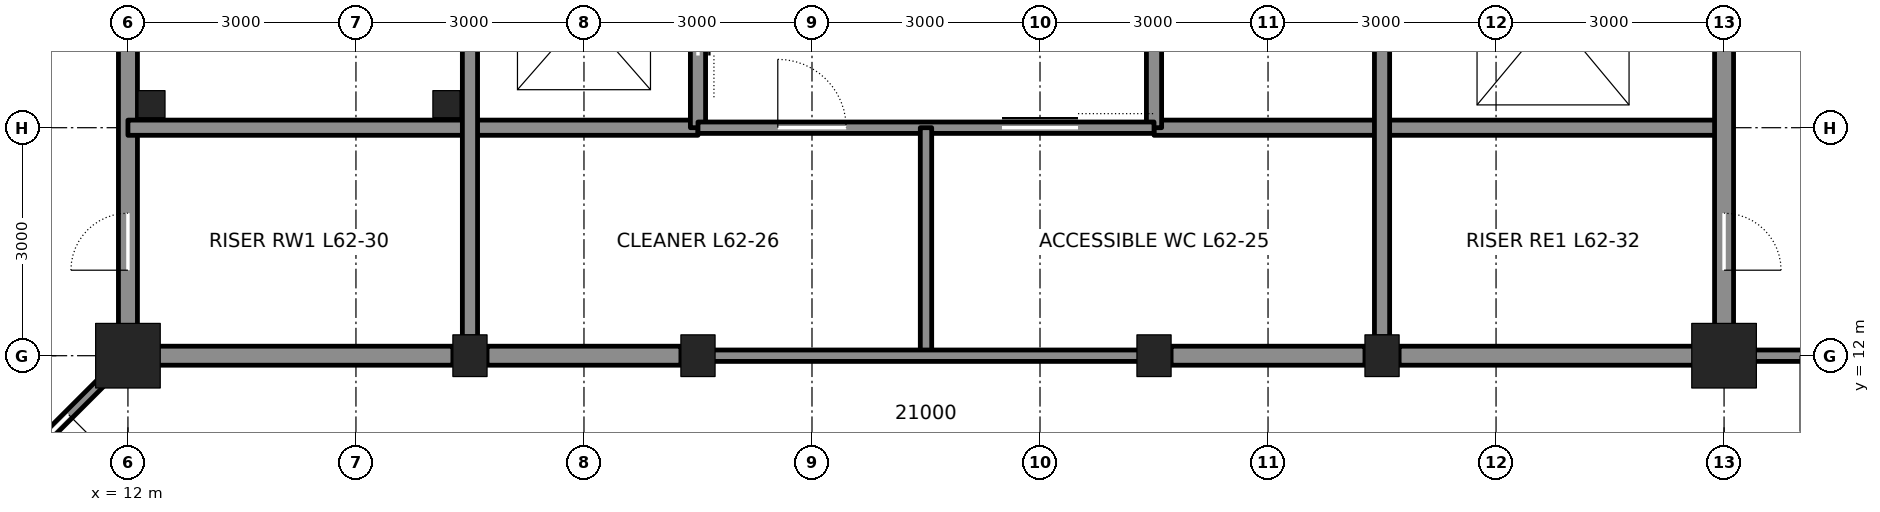
"""IFC4 building model, lengths in metres.
Left out: names, types, materials, properties, quantities, classifications, styles, units other than length and angle.
Written with IfcOpenShell. Run it as: python <this file> out.ifc"""

import sys

from ifc_helpers import new_model, si_unit, direction, frame, frame_2d, origin, origin_2d, place, context, subcontext, project, spatial, rectangle, hollow_rectangle, i_section, extrude, element, fill, save


model = new_model("IFC4")
c1 = context("Model", 3, precision=1e-05, world=origin(), true_north=direction((0.0, 1.0)))
c2 = subcontext(c1, "Body", "Model", "MODEL_VIEW")
j1 = project(units=[si_unit("LENGTHUNIT", "METRE"), si_unit("PLANEANGLEUNIT", "RADIAN")], contexts=[c1])
p1 = place(None, origin())
s1 = spatial("IfcSite", under=j1, at=p1, CompositionType="ELEMENT")
p2 = place(p1, origin())
s2 = spatial("IfcBuilding", under=s1, at=p2, CompositionType="ELEMENT")
p3 = place(p2, frame((0.0, 0.0, 279.0)))
s3 = spatial("IfcBuildingStorey", under=s2, at=p3, CompositionType="ELEMENT", Elevation=279.0)
p4 = place(p3, frame((12.0, 12.0, 0.0), z_axis=(0.0, 0.0, 1.0), x_axis=(1.0, 0.0, 0.0)))
e1 = element("IfcColumn", 1, at=p4, inside=s3, PredefinedType="COLUMN", context=c2, shape_type="SweptSolid", body=[
    extrude(hollow_rectangle(XDim=0.85, YDim=0.85, WallThickness=0.085, at=origin_2d()), origin(), (0.0, 0.0, 1.0), 4.2),
])
for number, where, z_axis, x_axis in (
    (2, (16.5, 12.0, 0.0), (0.0, 0.0, 1.0), (1.0, 0.0, 0.0)),
    (3, (19.5, 12.0, 0.0), (0.0, 0.0, 1.0), (1.0, 0.0, 0.0)),
    (4, (25.5, 12.0, 0.0), (0.0, 0.0, 1.0), (1.0, 0.0, 0.0)),
    (5, (28.5, 12.0, 0.0), (0.0, 0.0, 1.0), (1.0, 0.0, 0.0)),
):
    element("IfcColumn", number, at=place(p3, frame(where, z_axis=z_axis, x_axis=x_axis)), inside=s3, PredefinedType="COLUMN", context=c2, shape_type="SweptSolid", body=[
        extrude(i_section(OverallWidth=0.449, OverallDepth=0.549, WebThickness=0.072, FlangeThickness=0.115, at=origin_2d()), origin(), (0.0, 0.0, 1.0), 4.2),
    ])
p5 = place(p3, frame((33.0, 12.0, 0.0), z_axis=(0.0, 0.0, 1.0), x_axis=(1.0, 0.0, 0.0)))
e6 = element("IfcColumn", 6, at=p5, inside=s3, PredefinedType="COLUMN", context=c2, shape_type="SweptSolid", body=[
    extrude(hollow_rectangle(XDim=0.85, YDim=0.85, WallThickness=0.085, at=origin_2d()), origin(), (0.0, 0.0, 1.0), 4.2),
])
p6 = place(p3, frame((12.0, 12.25, 0.0), z_axis=(0.0, 0.0, 1.0), x_axis=(0.0, 1.0, 0.0)))
e7 = element("IfcWall", 7, at=p6, inside=s3, PredefinedType="SOLIDWALL", context=c2, shape_type="SweptSolid", body=[
    extrude(rectangle(XDim=8.5, YDim=0.25, at=frame_2d((4.25, 0.0))), origin(), (0.0, 0.0, 1.0), 3.113),
])
p7 = place(p6, frame((0.875, 0.0, 0.0)))
e8 = element("IfcOpeningElement", 8, at=p7, cuts=e7, PredefinedType="OPENING", context=c2, shape_type="SweptSolid", body=[
    extrude(rectangle(XDim=0.75, YDim=2.1, at=frame_2d((0.375, 1.05))), frame((0.0, 0.135, 0.0), z_axis=(0.0, -1.0, 0.0), x_axis=(1.0, 0.0, 0.0)), (0.0, 0.0, 1.0), 0.27),
])
p8 = place(p3, frame((12.25, 12.0, 0.0), z_axis=(0.0, 0.0, 1.0), x_axis=(1.0, 0.0, 0.0)))
e9 = element("IfcWall", 9, at=p8, inside=s3, PredefinedType="SOLIDWALL", context=c2, shape_type="SweptSolid", body=[
    extrude(rectangle(XDim=4.025, YDim=0.25, at=frame_2d((2.013, 0.0))), origin(), (0.0, 0.0, 1.0), 3.181),
])
for number, where, z_axis, x_axis in (
    (10, (16.725, 12.0, 0.0), (0.0, 0.0, 1.0), (1.0, 0.0, 0.0)),
    (11, (25.725, 12.0, 0.0), (0.0, 0.0, 1.0), (1.0, 0.0, 0.0)),
):
    element("IfcWall", number, at=place(p3, frame(where, z_axis=z_axis, x_axis=x_axis)), inside=s3, PredefinedType="SOLIDWALL", context=c2, shape_type="SweptSolid", body=[
        extrude(rectangle(XDim=2.55, YDim=0.25, at=frame_2d((1.275, 0.0))), origin(), (0.0, 0.0, 1.0), 3.181),
    ])
p9 = place(p3, frame((28.725, 12.0, 0.0), z_axis=(0.0, 0.0, 1.0), x_axis=(1.0, 0.0, 0.0)))
e12 = element("IfcWall", 12, at=p9, inside=s3, PredefinedType="SOLIDWALL", context=c2, shape_type="SweptSolid", body=[
    extrude(rectangle(XDim=4.025, YDim=0.25, at=frame_2d((2.013, 0.0))), origin(), (0.0, 0.0, 1.0), 3.181),
])
for number, where, z_axis, x_axis in (
    (13, (12.0, 15.0, 0.0), (0.0, 0.0, 1.0), (1.0, 0.0, 0.0)),
    (14, (25.5, 15.0, 0.0), (0.0, 0.0, 1.0), (1.0, 0.0, 0.0)),
):
    element("IfcWall", number, at=place(p3, frame(where, z_axis=z_axis, x_axis=x_axis)), inside=s3, PredefinedType="SOLIDWALL", context=c2, shape_type="SweptSolid", body=[
        extrude(rectangle(XDim=7.5, YDim=0.2, at=frame_2d((3.75, 0.0))), origin(), (0.0, 0.0, 1.0), 4.04),
    ])
p10 = place(p3, frame((16.5, 12.25, 0.0), z_axis=(0.0, 0.0, 1.0), x_axis=(0.0, 1.0, 0.0)))
e15 = element("IfcWall", 15, at=p10, inside=s3, PredefinedType="SOLIDWALL", context=c2, shape_type="SweptSolid", body=[
    extrude(rectangle(XDim=8.5, YDim=0.2, at=frame_2d((4.25, 0.0))), origin(), (0.0, 0.0, 1.0), 3.113),
])
p11 = place(p3, frame((19.5, 15.0, 0.0), z_axis=(0.0, 0.0, 1.0), x_axis=(0.0, 1.0, 0.0)))
e16 = element("IfcWall", 16, at=p11, inside=s3, PredefinedType="SOLIDWALL", context=c2, shape_type="SweptSolid", body=[
    extrude(rectangle(XDim=12.0, YDim=0.2, at=frame_2d((6.0, 0.0))), origin(), (0.0, 0.0, 1.0), 3.065),
])
p12 = place(p11, frame((0.95, 0.0, 0.0)))
e17 = element("IfcOpeningElement", 17, at=p12, cuts=e16, PredefinedType="OPENING", context=c2, shape_type="SweptSolid", body=[
    extrude(rectangle(XDim=1.1, YDim=2.1, at=frame_2d((0.55, 1.05))), frame((0.0, 0.11, 0.0), z_axis=(0.0, -1.0, 0.0), x_axis=(1.0, 0.0, 0.0)), (0.0, 0.0, 1.0), 0.22),
])
p13 = place(p11, frame((3.95, 0.0, 0.0)))
e18 = element("IfcOpeningElement", 18, at=p13, cuts=e16, PredefinedType="OPENING", context=c2, shape_type="SweptSolid", body=[
    extrude(rectangle(XDim=1.1, YDim=2.1, at=frame_2d((0.55, 1.05))), frame((0.0, 0.11, 0.0), z_axis=(0.0, -1.0, 0.0), x_axis=(1.0, 0.0, 0.0)), (0.0, 0.0, 1.0), 0.22),
])
p14 = place(p11, frame((6.95, 0.0, 0.0)))
e19 = element("IfcOpeningElement", 19, at=p14, cuts=e16, PredefinedType="OPENING", context=c2, shape_type="SweptSolid", body=[
    extrude(rectangle(XDim=1.1, YDim=2.1, at=frame_2d((0.55, 1.05))), frame((0.0, 0.11, 0.0), z_axis=(0.0, -1.0, 0.0), x_axis=(1.0, 0.0, 0.0)), (0.0, 0.0, 1.0), 0.22),
])
p15 = place(p11, frame((9.95, 0.0, 0.0)))
e20 = element("IfcOpeningElement", 20, at=p15, cuts=e16, PredefinedType="OPENING", context=c2, shape_type="SweptSolid", body=[
    extrude(rectangle(XDim=1.1, YDim=2.1, at=frame_2d((0.55, 1.05))), frame((0.0, 0.11, 0.0), z_axis=(0.0, -1.0, 0.0), x_axis=(1.0, 0.0, 0.0)), (0.0, 0.0, 1.0), 0.22),
])
p16 = place(p3, frame((25.5, 15.0, 0.0), z_axis=(0.0, 0.0, 1.0), x_axis=(0.0, 1.0, 0.0)))
e21 = element("IfcWall", 21, at=p16, inside=s3, PredefinedType="SOLIDWALL", context=c2, shape_type="SweptSolid", body=[
    extrude(rectangle(XDim=12.0, YDim=0.2, at=frame_2d((6.0, 0.0))), origin(), (0.0, 0.0, 1.0), 3.065),
])
p17 = place(p16, frame((2.55, 0.0, 0.0)))
e22 = element("IfcOpeningElement", 22, at=p17, cuts=e21, PredefinedType="OPENING", context=c2, shape_type="SweptSolid", body=[
    extrude(rectangle(XDim=0.9, YDim=2.1, at=frame_2d((0.45, 1.05))), frame((0.0, 0.11, 0.0), z_axis=(0.0, -1.0, 0.0), x_axis=(1.0, 0.0, 0.0)), (0.0, 0.0, 1.0), 0.22),
])
p18 = place(p3, frame((28.5, 12.25, 0.0), z_axis=(0.0, 0.0, 1.0), x_axis=(0.0, 1.0, 0.0)))
e23 = element("IfcWall", 23, at=p18, inside=s3, PredefinedType="SOLIDWALL", context=c2, shape_type="SweptSolid", body=[
    extrude(rectangle(XDim=8.5, YDim=0.2, at=frame_2d((4.25, 0.0))), origin(), (0.0, 0.0, 1.0), 3.113),
])
p19 = place(p3, frame((33.0, 12.25, 0.0), z_axis=(0.0, 0.0, 1.0), x_axis=(0.0, 1.0, 0.0)))
e24 = element("IfcWall", 24, at=p19, inside=s3, PredefinedType="SOLIDWALL", context=c2, shape_type="SweptSolid", body=[
    extrude(rectangle(XDim=8.5, YDim=0.25, at=frame_2d((4.25, 0.0))), origin(), (0.0, 0.0, 1.0), 3.113),
])
p20 = place(p19, frame((6.65, 0.0, 0.0)))
e25 = element("IfcOpeningElement", 25, at=p20, cuts=e24, PredefinedType="OPENING", context=c2, shape_type="SweptSolid", body=[
    extrude(rectangle(XDim=1.2, YDim=2.1, at=frame_2d((0.6, 1.05))), frame((0.0, 0.135, 0.0), z_axis=(0.0, -1.0, 0.0), x_axis=(1.0, 0.0, 0.0)), (0.0, 0.0, 1.0), 0.27),
])
p21 = place(p19, frame((0.875, 0.0, 0.0)))
e26 = element("IfcOpeningElement", 26, at=p21, cuts=e24, PredefinedType="OPENING", context=c2, shape_type="SweptSolid", body=[
    extrude(rectangle(XDim=0.75, YDim=2.1, at=frame_2d((0.375, 1.05))), frame((0.0, 0.135, 0.0), z_axis=(0.0, -1.0, 0.0), x_axis=(1.0, 0.0, 0.0)), (0.0, 0.0, 1.0), 0.27),
])
p22 = place(p3, frame((19.5, 15.0, 0.0), z_axis=(0.0, 0.0, 1.0), x_axis=(1.0, 0.0, 0.0)))
e27 = element("IfcWall", 27, at=p22, inside=s3, PredefinedType="PARTITIONING", context=c2, shape_type="SweptSolid", body=[
    extrude(rectangle(XDim=6.0, YDim=0.15, at=frame_2d((3.0, 0.0))), origin(), (0.0, 0.0, 1.0), 4.04),
])
p23 = place(p22, frame((4.0, 0.0, 0.0)))
e28 = element("IfcOpeningElement", 28, at=p23, cuts=e27, PredefinedType="OPENING", context=c2, shape_type="SweptSolid", body=[
    extrude(rectangle(XDim=1.0, YDim=2.1, at=frame_2d((0.5, 1.05))), frame((0.0, 0.085, 0.0), z_axis=(0.0, -1.0, 0.0), x_axis=(1.0, 0.0, 0.0)), (0.0, 0.0, 1.0), 0.17),
])
p24 = place(p22, frame((1.05, 0.0, 0.0)))
e29 = element("IfcOpeningElement", 29, at=p24, cuts=e27, PredefinedType="OPENING", context=c2, shape_type="SweptSolid", body=[
    extrude(rectangle(XDim=0.9, YDim=2.1, at=frame_2d((0.45, 1.05))), frame((0.0, 0.085, 0.0), z_axis=(0.0, -1.0, 0.0), x_axis=(1.0, 0.0, 0.0)), (0.0, 0.0, 1.0), 0.17),
])
p25 = place(p3, frame((22.5, 15.0, 0.0), z_axis=(0.0, 0.0, 1.0), x_axis=(0.0, -1.0, 0.0)))
e30 = element("IfcWall", 30, at=p25, inside=s3, PredefinedType="PARTITIONING", context=c2, shape_type="SweptSolid", body=[
    extrude(rectangle(XDim=3.0, YDim=0.15, at=frame_2d((1.5, 0.0))), origin(), (0.0, 0.0, 1.0), 4.04),
])
p26 = place(p3, frame((19.5, 12.0, 0.0), z_axis=(0.0, 0.0, 1.0), x_axis=(1.0, 0.0, 0.0)))
e31 = element("IfcWall", 31, at=p26, inside=s3, PredefinedType="PARTITIONING", context=c2, shape_type="SweptSolid", body=[
    extrude(rectangle(XDim=6.0, YDim=0.15, at=frame_2d((3.0, 0.0))), origin(), (0.0, 0.0, 1.0), 3.181),
])
p27 = place(p3, frame((33.0, 12.0, 0.0), z_axis=(0.0, 0.0, 1.0), x_axis=(1.0, 0.0, 0.0)))
e32 = element("IfcWall", 32, at=p27, inside=s3, PredefinedType="PARTITIONING", context=c2, shape_type="SweptSolid", body=[
    extrude(rectangle(XDim=3.0, YDim=0.15, at=frame_2d((1.5, 0.0))), origin(), (0.0, 0.0, 1.0), 3.271),
])
p28 = place(p27, frame((1.0, 0.0, 0.0)))
e33 = element("IfcOpeningElement", 33, at=p28, cuts=e32, PredefinedType="OPENING", context=c2, shape_type="SweptSolid", body=[
    extrude(rectangle(XDim=1.0, YDim=2.4, at=frame_2d((0.5, 1.2))), frame((0.0, 0.085, 0.0), z_axis=(0.0, -1.0, 0.0), x_axis=(1.0, 0.0, 0.0)), (0.0, 0.0, 1.0), 0.17),
])
p29 = place(p3, frame((12.0, 12.0, 0.0), z_axis=(0.0, 0.0, 1.0), x_axis=(-0.707106781187, -0.707106781187, 0.0)))
e34 = element("IfcWall", 34, at=p29, inside=s3, PredefinedType="PARTITIONING", context=c2, shape_type="SweptSolid", body=[
    extrude(rectangle(XDim=3.59, YDim=0.12, at=frame_2d((1.795, 0.0))), origin(), (0.0, 0.0, 1.0), 4.04),
])
p30 = place(p29, frame((1.1, 0.0, 0.0)))
e35 = element("IfcOpeningElement", 35, at=p30, cuts=e34, PredefinedType="OPENING", context=c2, shape_type="SweptSolid", body=[
    extrude(rectangle(XDim=1.0, YDim=2.4, at=frame_2d((0.5, 1.2))), frame((0.0, 0.07, 0.0), z_axis=(0.0, -1.0, 0.0), x_axis=(1.0, 0.0, 0.0)), (0.0, 0.0, 1.0), 0.14),
])
for number, where, z_axis, x_axis in (
    (36, (12.31, 15.31, 0.0), (0.0, 0.0, 1.0), (1.0, 0.0, 0.0)),
    (37, (16.19, 15.31, 0.0), (0.0, 0.0, 1.0), (1.0, 0.0, 0.0)),
):
    element("IfcColumn", number, at=place(p3, frame(where, z_axis=z_axis, x_axis=x_axis)), inside=s3, PredefinedType="COLUMN", context=c2, shape_type="SweptSolid", body=[
        extrude(hollow_rectangle(XDim=0.356, YDim=0.356, WallThickness=0.009, at=origin_2d()), origin(), (0.0, 0.0, 1.0), 4.2),
    ])
p31 = place(p7, origin())
e38 = element("IfcDoor", 38, at=p31, inside=s3, OperationType="SINGLE_SWING_LEFT", PredefinedType="DOOR", context=c2, shape_type="SweptSolid", body=[
    extrude(rectangle(XDim=0.75, YDim=2.1, at=frame_2d((0.375, 1.05))), frame((0.0, 0.025, 0.0), z_axis=(0.0, -1.0, 0.0), x_axis=(1.0, 0.0, 0.0)), (0.0, 0.0, 1.0), 0.05),
])
fill(e8, e38)
p32 = place(p21, frame((0.75, 0.0, 0.0), z_axis=(0.0, 0.0, 1.0), x_axis=(-1.0, 0.0, 0.0)))
e39 = element("IfcDoor", 39, at=p32, inside=s3, OperationType="SINGLE_SWING_RIGHT", PredefinedType="DOOR", context=c2, shape_type="SweptSolid", body=[
    extrude(rectangle(XDim=0.75, YDim=2.1, at=frame_2d((0.375, 1.05))), frame((0.0, 0.025, 0.0), z_axis=(0.0, -1.0, 0.0), x_axis=(1.0, 0.0, 0.0)), (0.0, 0.0, 1.0), 0.05),
])
fill(e26, e39)
p33 = place(p23, origin())
e40 = element("IfcDoor", 40, at=p33, inside=s3, OperationType="SLIDING_TO_LEFT", PredefinedType="DOOR", context=c2, shape_type="SweptSolid", body=[
    extrude(rectangle(XDim=1.0, YDim=2.1, at=frame_2d((0.5, 1.05))), frame((0.0, 0.025, 0.0), z_axis=(0.0, -1.0, 0.0), x_axis=(1.0, 0.0, 0.0)), (0.0, 0.0, 1.0), 0.05),
])
fill(e28, e40)
p34 = place(p24, origin())
e41 = element("IfcDoor", 41, at=p34, inside=s3, OperationType="SINGLE_SWING_LEFT", PredefinedType="DOOR", context=c2, shape_type="SweptSolid", body=[
    extrude(rectangle(XDim=0.9, YDim=2.1, at=frame_2d((0.45, 1.05))), frame((0.0, 0.025, 0.0), z_axis=(0.0, -1.0, 0.0), x_axis=(1.0, 0.0, 0.0)), (0.0, 0.0, 1.0), 0.05),
])
fill(e29, e41)
p35 = place(p12, origin())
e42 = element("IfcDoor", 42, at=p35, inside=s3, OperationType="DOUBLE_DOOR_SLIDING", PredefinedType="DOOR", context=c2, shape_type="SweptSolid", body=[
    extrude(rectangle(XDim=1.1, YDim=2.1, at=frame_2d((0.55, 1.05))), frame((0.0, 0.025, 0.0), z_axis=(0.0, -1.0, 0.0), x_axis=(1.0, 0.0, 0.0)), (0.0, 0.0, 1.0), 0.05),
])
fill(e17, e42)
p36 = place(p30, origin())
e43 = element("IfcDoor", 43, at=p36, inside=s3, OperationType="SINGLE_SWING_LEFT", PredefinedType="DOOR", context=c2, shape_type="SweptSolid", body=[
    extrude(rectangle(XDim=1.0, YDim=2.4, at=frame_2d((0.5, 1.2))), frame((0.0, 0.025, 0.0), z_axis=(0.0, -1.0, 0.0), x_axis=(1.0, 0.0, 0.0)), (0.0, 0.0, 1.0), 0.05),
])
fill(e35, e43)
save(model, sys.argv[1])
